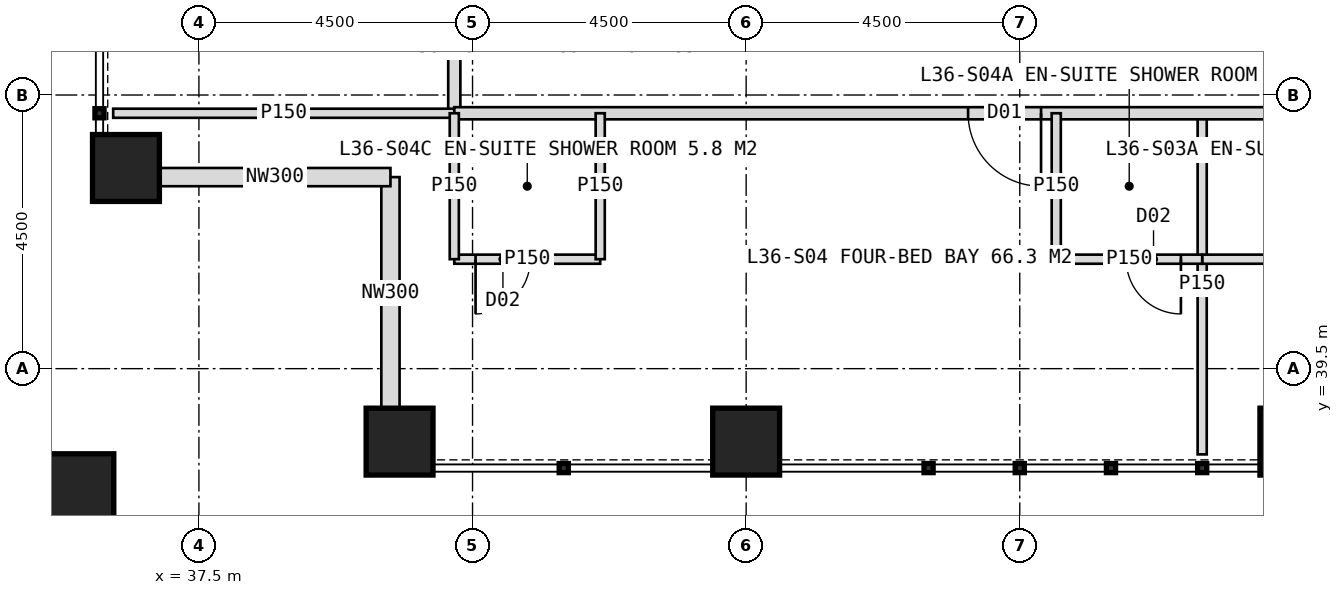
"""IFC4 building model, lengths in metres.
Left out: names, types, materials, properties, quantities, classifications, styles, units other than length and angle.
Written with IfcOpenShell. Run it as: python <this file> out.ifc"""

import sys

from ifc_helpers import new_model, si_unit, direction, frame, frame_2d, origin, origin_2d, place, context, subcontext, project, spatial, rectangle, hollow_rectangle, extrude, element, fill, save


model = new_model("IFC4")
c1 = context("Model", 3, precision=1e-05, world=origin(), true_north=direction((0.0, 1.0)))
c2 = subcontext(c1, "Body", "Model", "MODEL_VIEW")
j1 = project(units=[si_unit("LENGTHUNIT", "METRE"), si_unit("PLANEANGLEUNIT", "RADIAN")], contexts=[c1])
p1 = place(None, origin())
s1 = spatial("IfcSite", under=j1, at=p1, CompositionType="ELEMENT")
p2 = place(p1, origin())
s2 = spatial("IfcBuilding", under=s1, at=p2, CompositionType="ELEMENT")
p3 = place(p2, frame((0.0, 0.0, 152.0)))
s3 = spatial("IfcBuildingStorey", under=s2, at=p3, CompositionType="ELEMENT", Elevation=152.0)
for number, where, z_axis, x_axis in (
    (1, (40.8, 38.3, 0.0), (0.0, 0.0, 1.0), (1.0, 0.0, 0.0)),
    (2, (36.3, 42.8, 0.0), (0.0, 0.0, 1.0), (1.0, 0.0, 0.0)),
    (3, (46.5, 38.3, 0.0), (0.0, 0.0, 1.0), (1.0, 0.0, 0.0)),
    (4, (55.5, 38.3, 0.0), (0.0, 0.0, 1.0), (1.0, 0.0, 0.0)),
):
    element("IfcColumn", number, at=place(p3, frame(where, z_axis=z_axis, x_axis=x_axis)), inside=s3, PredefinedType="COLUMN", context=c2, shape_type="SweptSolid", body=[
        extrude(hollow_rectangle(XDim=1.1, YDim=1.1, WallThickness=0.1, at=origin_2d()), origin(), (0.0, 0.0, 1.0), 4.0),
    ])
p4 = place(p3, frame((35.4, 37.4, 0.0), z_axis=(0.0, 0.0, 1.0), x_axis=(1.0, 0.0, 0.0)))
e5 = element("IfcColumn", 5, at=p4, inside=s3, PredefinedType="COLUMN", context=c2, shape_type="SweptSolid", body=[
    extrude(hollow_rectangle(XDim=1.4, YDim=1.4, WallThickness=0.08, at=origin_2d()), origin(), (0.0, 0.0, 1.0), 4.0),
])
for number, where, z_axis, x_axis in (
    (6, (40.65, 38.85, 0.0), (0.0, 0.0, 1.0), (0.0, 1.0, 0.0)),
    (7, (40.65, 42.65, 0.0), (0.0, 0.0, 1.0), (-1.0, 0.0, 0.0)),
):
    element("IfcWall", number, at=place(p3, frame(where, z_axis=z_axis, x_axis=x_axis)), inside=s3, PredefinedType="ELEMENTEDWALL", context=c2, shape_type="SweptSolid", body=[
        extrude(rectangle(XDim=3.8, YDim=0.3, at=frame_2d((1.9, 0.0))), origin(), (0.0, 0.0, 1.0), 4.0),
    ])
p5 = place(p3, frame((41.7, 43.7, 0.0), z_axis=(0.0, 0.0, 1.0), x_axis=(0.0, 1.0, 0.0)))
e8 = element("IfcWall", 8, at=p5, inside=s3, PredefinedType="PARTITIONING", context=c2, shape_type="SweptSolid", body=[
    extrude(rectangle(XDim=36.6, YDim=0.2, at=frame_2d((18.3, 0.0))), origin(), (0.0, 0.0, 1.0), 3.75),
])
p6 = place(p5, frame((3.35, 0.0, 0.0)))
e9 = element("IfcOpeningElement", 9, at=p6, cuts=e8, PredefinedType="OPENING", context=c2, shape_type="SweptSolid", body=[
    extrude(rectangle(XDim=1.2, YDim=2.2, at=frame_2d((0.6, 1.1))), frame((0.0, 0.11, 0.0), z_axis=(0.0, -1.0, 0.0), x_axis=(1.0, 0.0, 0.0)), (0.0, 0.0, 1.0), 0.22),
])
p7 = place(p5, frame((11.05, 0.0, 0.0)))
e10 = element("IfcOpeningElement", 10, at=p7, cuts=e8, PredefinedType="OPENING", context=c2, shape_type="SweptSolid", body=[
    extrude(rectangle(XDim=1.2, YDim=2.2, at=frame_2d((0.6, 1.1))), frame((0.0, 0.11, 0.0), z_axis=(0.0, -1.0, 0.0), x_axis=(1.0, 0.0, 0.0)), (0.0, 0.0, 1.0), 0.22),
])
p8 = place(p5, frame((16.3, 0.0, 0.0)))
e11 = element("IfcOpeningElement", 11, at=p8, cuts=e8, PredefinedType="OPENING", context=c2, shape_type="SweptSolid", body=[
    extrude(rectangle(XDim=1.0, YDim=2.1, at=frame_2d((0.5, 1.05))), frame((0.0, 0.11, 0.0), z_axis=(0.0, -1.0, 0.0), x_axis=(1.0, 0.0, 0.0)), (0.0, 0.0, 1.0), 0.22),
])
p9 = place(p5, frame((20.95, 0.0, 0.0)))
e12 = element("IfcOpeningElement", 12, at=p9, cuts=e8, PredefinedType="OPENING", context=c2, shape_type="SweptSolid", body=[
    extrude(rectangle(XDim=1.2, YDim=2.2, at=frame_2d((0.6, 1.1))), frame((0.0, 0.11, 0.0), z_axis=(0.0, -1.0, 0.0), x_axis=(1.0, 0.0, 0.0)), (0.0, 0.0, 1.0), 0.22),
])
p10 = place(p5, frame((32.75, 0.0, 0.0)))
e13 = element("IfcOpeningElement", 13, at=p10, cuts=e8, PredefinedType="OPENING", context=c2, shape_type="SweptSolid", body=[
    extrude(rectangle(XDim=1.2, YDim=2.2, at=frame_2d((0.6, 1.1))), frame((0.0, 0.11, 0.0), z_axis=(0.0, -1.0, 0.0), x_axis=(1.0, 0.0, 0.0)), (0.0, 0.0, 1.0), 0.22),
])
for number, where, z_axis, x_axis in (
    (14, (41.7, 43.7, 0.0), (0.0, 0.0, 1.0), (-1.0, 0.0, 0.0)),
    (15, (54.0, 43.7, 0.0), (0.0, 0.0, 1.0), (0.0, -1.0, 0.0)),
):
    element("IfcWall", number, at=place(p3, frame(where, z_axis=z_axis, x_axis=x_axis)), inside=s3, PredefinedType="PARTITIONING", context=c2, shape_type="SweptSolid", body=[
        extrude(rectangle(XDim=5.61, YDim=0.15, at=frame_2d((2.805, 0.0))), origin(), (0.0, 0.0, 1.0), 3.75),
    ])
p11 = place(p3, frame((78.3, 43.7, 0.0), z_axis=(0.0, 0.0, 1.0), x_axis=(-1.0, 0.0, 0.0)))
e16 = element("IfcWall", 16, at=p11, inside=s3, PredefinedType="PARTITIONING", context=c2, shape_type="SweptSolid", body=[
    extrude(rectangle(XDim=36.6, YDim=0.2, at=frame_2d((18.3, 0.0))), origin(), (0.0, 0.0, 1.0), 3.75),
])
p12 = place(p11, frame((3.35, 0.0, 0.0)))
e17 = element("IfcOpeningElement", 17, at=p12, cuts=e16, PredefinedType="OPENING", context=c2, shape_type="SweptSolid", body=[
    extrude(rectangle(XDim=1.2, YDim=2.2, at=frame_2d((0.6, 1.1))), frame((0.0, 0.11, 0.0), z_axis=(0.0, -1.0, 0.0), x_axis=(1.0, 0.0, 0.0)), (0.0, 0.0, 1.0), 0.22),
])
p13 = place(p11, frame((11.05, 0.0, 0.0)))
e18 = element("IfcOpeningElement", 18, at=p13, cuts=e16, PredefinedType="OPENING", context=c2, shape_type="SweptSolid", body=[
    extrude(rectangle(XDim=1.2, YDim=2.2, at=frame_2d((0.6, 1.1))), frame((0.0, 0.11, 0.0), z_axis=(0.0, -1.0, 0.0), x_axis=(1.0, 0.0, 0.0)), (0.0, 0.0, 1.0), 0.22),
])
p14 = place(p11, frame((19.85, 0.0, 0.0)))
e19 = element("IfcOpeningElement", 19, at=p14, cuts=e16, PredefinedType="OPENING", context=c2, shape_type="SweptSolid", body=[
    extrude(rectangle(XDim=1.2, YDim=2.2, at=frame_2d((0.6, 1.1))), frame((0.0, 0.11, 0.0), z_axis=(0.0, -1.0, 0.0), x_axis=(1.0, 0.0, 0.0)), (0.0, 0.0, 1.0), 0.22),
])
p15 = place(p11, frame((26.95, 0.0, 0.0)))
e20 = element("IfcOpeningElement", 20, at=p15, cuts=e16, PredefinedType="OPENING", context=c2, shape_type="SweptSolid", body=[
    extrude(rectangle(XDim=1.2, YDim=2.2, at=frame_2d((0.6, 1.1))), frame((0.0, 0.11, 0.0), z_axis=(0.0, -1.0, 0.0), x_axis=(1.0, 0.0, 0.0)), (0.0, 0.0, 1.0), 0.22),
])
p16 = place(p3, frame((57.0, 41.3, 0.0), z_axis=(0.0, 0.0, 1.0), x_axis=(-1.0, 0.0, 0.0)))
e21 = element("IfcWall", 21, at=p16, inside=s3, PredefinedType="PARTITIONING", context=c2, shape_type="SweptSolid", body=[
    extrude(rectangle(XDim=3.0, YDim=0.15, at=frame_2d((1.5, 0.0))), origin(), (0.0, 0.0, 1.0), 3.75),
])
p17 = place(p16, frame((0.35, 0.0, 0.0)))
e22 = element("IfcOpeningElement", 22, at=p17, cuts=e21, PredefinedType="OPENING", context=c2, shape_type="SweptSolid", body=[
    extrude(rectangle(XDim=0.9, YDim=2.1, at=frame_2d((0.45, 1.05))), frame((0.0, 0.085, 0.0), z_axis=(0.0, -1.0, 0.0), x_axis=(1.0, 0.0, 0.0)), (0.0, 0.0, 1.0), 0.17),
])
p18 = place(p3, frame((54.0, 41.3, 0.0), z_axis=(0.0, 0.0, 1.0), x_axis=(-1.0, 0.0, 0.0)))
e23 = element("IfcWall", 23, at=p18, inside=s3, PredefinedType="PARTITIONING", context=c2, shape_type="SweptSolid", body=[
    extrude(rectangle(XDim=2.4, YDim=0.15, at=frame_2d((1.2, 0.0))), origin(), (0.0, 0.0, 1.0), 3.75),
])
p19 = place(p18, frame((0.35, 0.0, 0.0)))
e24 = element("IfcOpeningElement", 24, at=p19, cuts=e23, PredefinedType="OPENING", context=c2, shape_type="SweptSolid", body=[
    extrude(rectangle(XDim=0.9, YDim=2.1, at=frame_2d((0.45, 1.05))), frame((0.0, 0.085, 0.0), z_axis=(0.0, -1.0, 0.0), x_axis=(1.0, 0.0, 0.0)), (0.0, 0.0, 1.0), 0.17),
])
p20 = place(p3, frame((51.6, 43.7, 0.0), z_axis=(0.0, 0.0, 1.0), x_axis=(0.0, -1.0, 0.0)))
e25 = element("IfcWall", 25, at=p20, inside=s3, PredefinedType="PARTITIONING", context=c2, shape_type="SweptSolid", body=[
    extrude(rectangle(XDim=2.4, YDim=0.15, at=frame_2d((1.2, 0.0))), origin(), (0.0, 0.0, 1.0), 3.75),
])
p21 = place(p3, frame((44.1, 41.3, 0.0), z_axis=(0.0, 0.0, 1.0), x_axis=(-1.0, 0.0, 0.0)))
e26 = element("IfcWall", 26, at=p21, inside=s3, PredefinedType="PARTITIONING", context=c2, shape_type="SweptSolid", body=[
    extrude(rectangle(XDim=2.4, YDim=0.15, at=frame_2d((1.2, 0.0))), origin(), (0.0, 0.0, 1.0), 3.75),
])
p22 = place(p21, frame((1.15, 0.0, 0.0)))
e27 = element("IfcOpeningElement", 27, at=p22, cuts=e26, PredefinedType="OPENING", context=c2, shape_type="SweptSolid", body=[
    extrude(rectangle(XDim=0.9, YDim=2.1, at=frame_2d((0.45, 1.05))), frame((0.0, 0.085, 0.0), z_axis=(0.0, -1.0, 0.0), x_axis=(1.0, 0.0, 0.0)), (0.0, 0.0, 1.0), 0.17),
])
for number, where, z_axis, x_axis in (
    (28, (44.1, 43.7, 0.0), (0.0, 0.0, 1.0), (0.0, -1.0, 0.0)),
    (29, (41.7, 43.7, 0.0), (0.0, 0.0, 1.0), (0.0, -1.0, 0.0)),
):
    element("IfcWall", number, at=place(p3, frame(where, z_axis=z_axis, x_axis=x_axis)), inside=s3, PredefinedType="PARTITIONING", context=c2, shape_type="SweptSolid", body=[
        extrude(rectangle(XDim=2.4, YDim=0.15, at=frame_2d((1.2, 0.0))), origin(), (0.0, 0.0, 1.0), 3.75),
    ])
p23 = place(p15, origin())
e30 = element("IfcDoor", 30, at=p23, inside=s3, OperationType="SINGLE_SWING_LEFT", PredefinedType="DOOR", context=c2, shape_type="SweptSolid", body=[
    extrude(rectangle(XDim=1.2, YDim=2.2, at=frame_2d((0.6, 1.1))), frame((0.0, 0.025, 0.0), z_axis=(0.0, -1.0, 0.0), x_axis=(1.0, 0.0, 0.0)), (0.0, 0.0, 1.0), 0.05),
])
fill(e20, e30)
p24 = place(p19, origin())
e31 = element("IfcDoor", 31, at=p24, inside=s3, OperationType="SINGLE_SWING_LEFT", PredefinedType="DOOR", context=c2, shape_type="SweptSolid", body=[
    extrude(rectangle(XDim=0.9, YDim=2.1, at=frame_2d((0.45, 1.05))), frame((0.0, 0.025, 0.0), z_axis=(0.0, -1.0, 0.0), x_axis=(1.0, 0.0, 0.0)), (0.0, 0.0, 1.0), 0.05),
])
fill(e24, e31)
p25 = place(p22, origin())
e32 = element("IfcDoor", 32, at=p25, inside=s3, OperationType="SINGLE_SWING_RIGHT", PredefinedType="DOOR", context=c2, shape_type="SweptSolid", body=[
    extrude(rectangle(XDim=0.9, YDim=2.1, at=frame_2d((0.45, 1.05))), frame((0.0, 0.025, 0.0), z_axis=(0.0, -1.0, 0.0), x_axis=(1.0, 0.0, 0.0)), (0.0, 0.0, 1.0), 0.05),
])
fill(e27, e32)
save(model, sys.argv[1])
